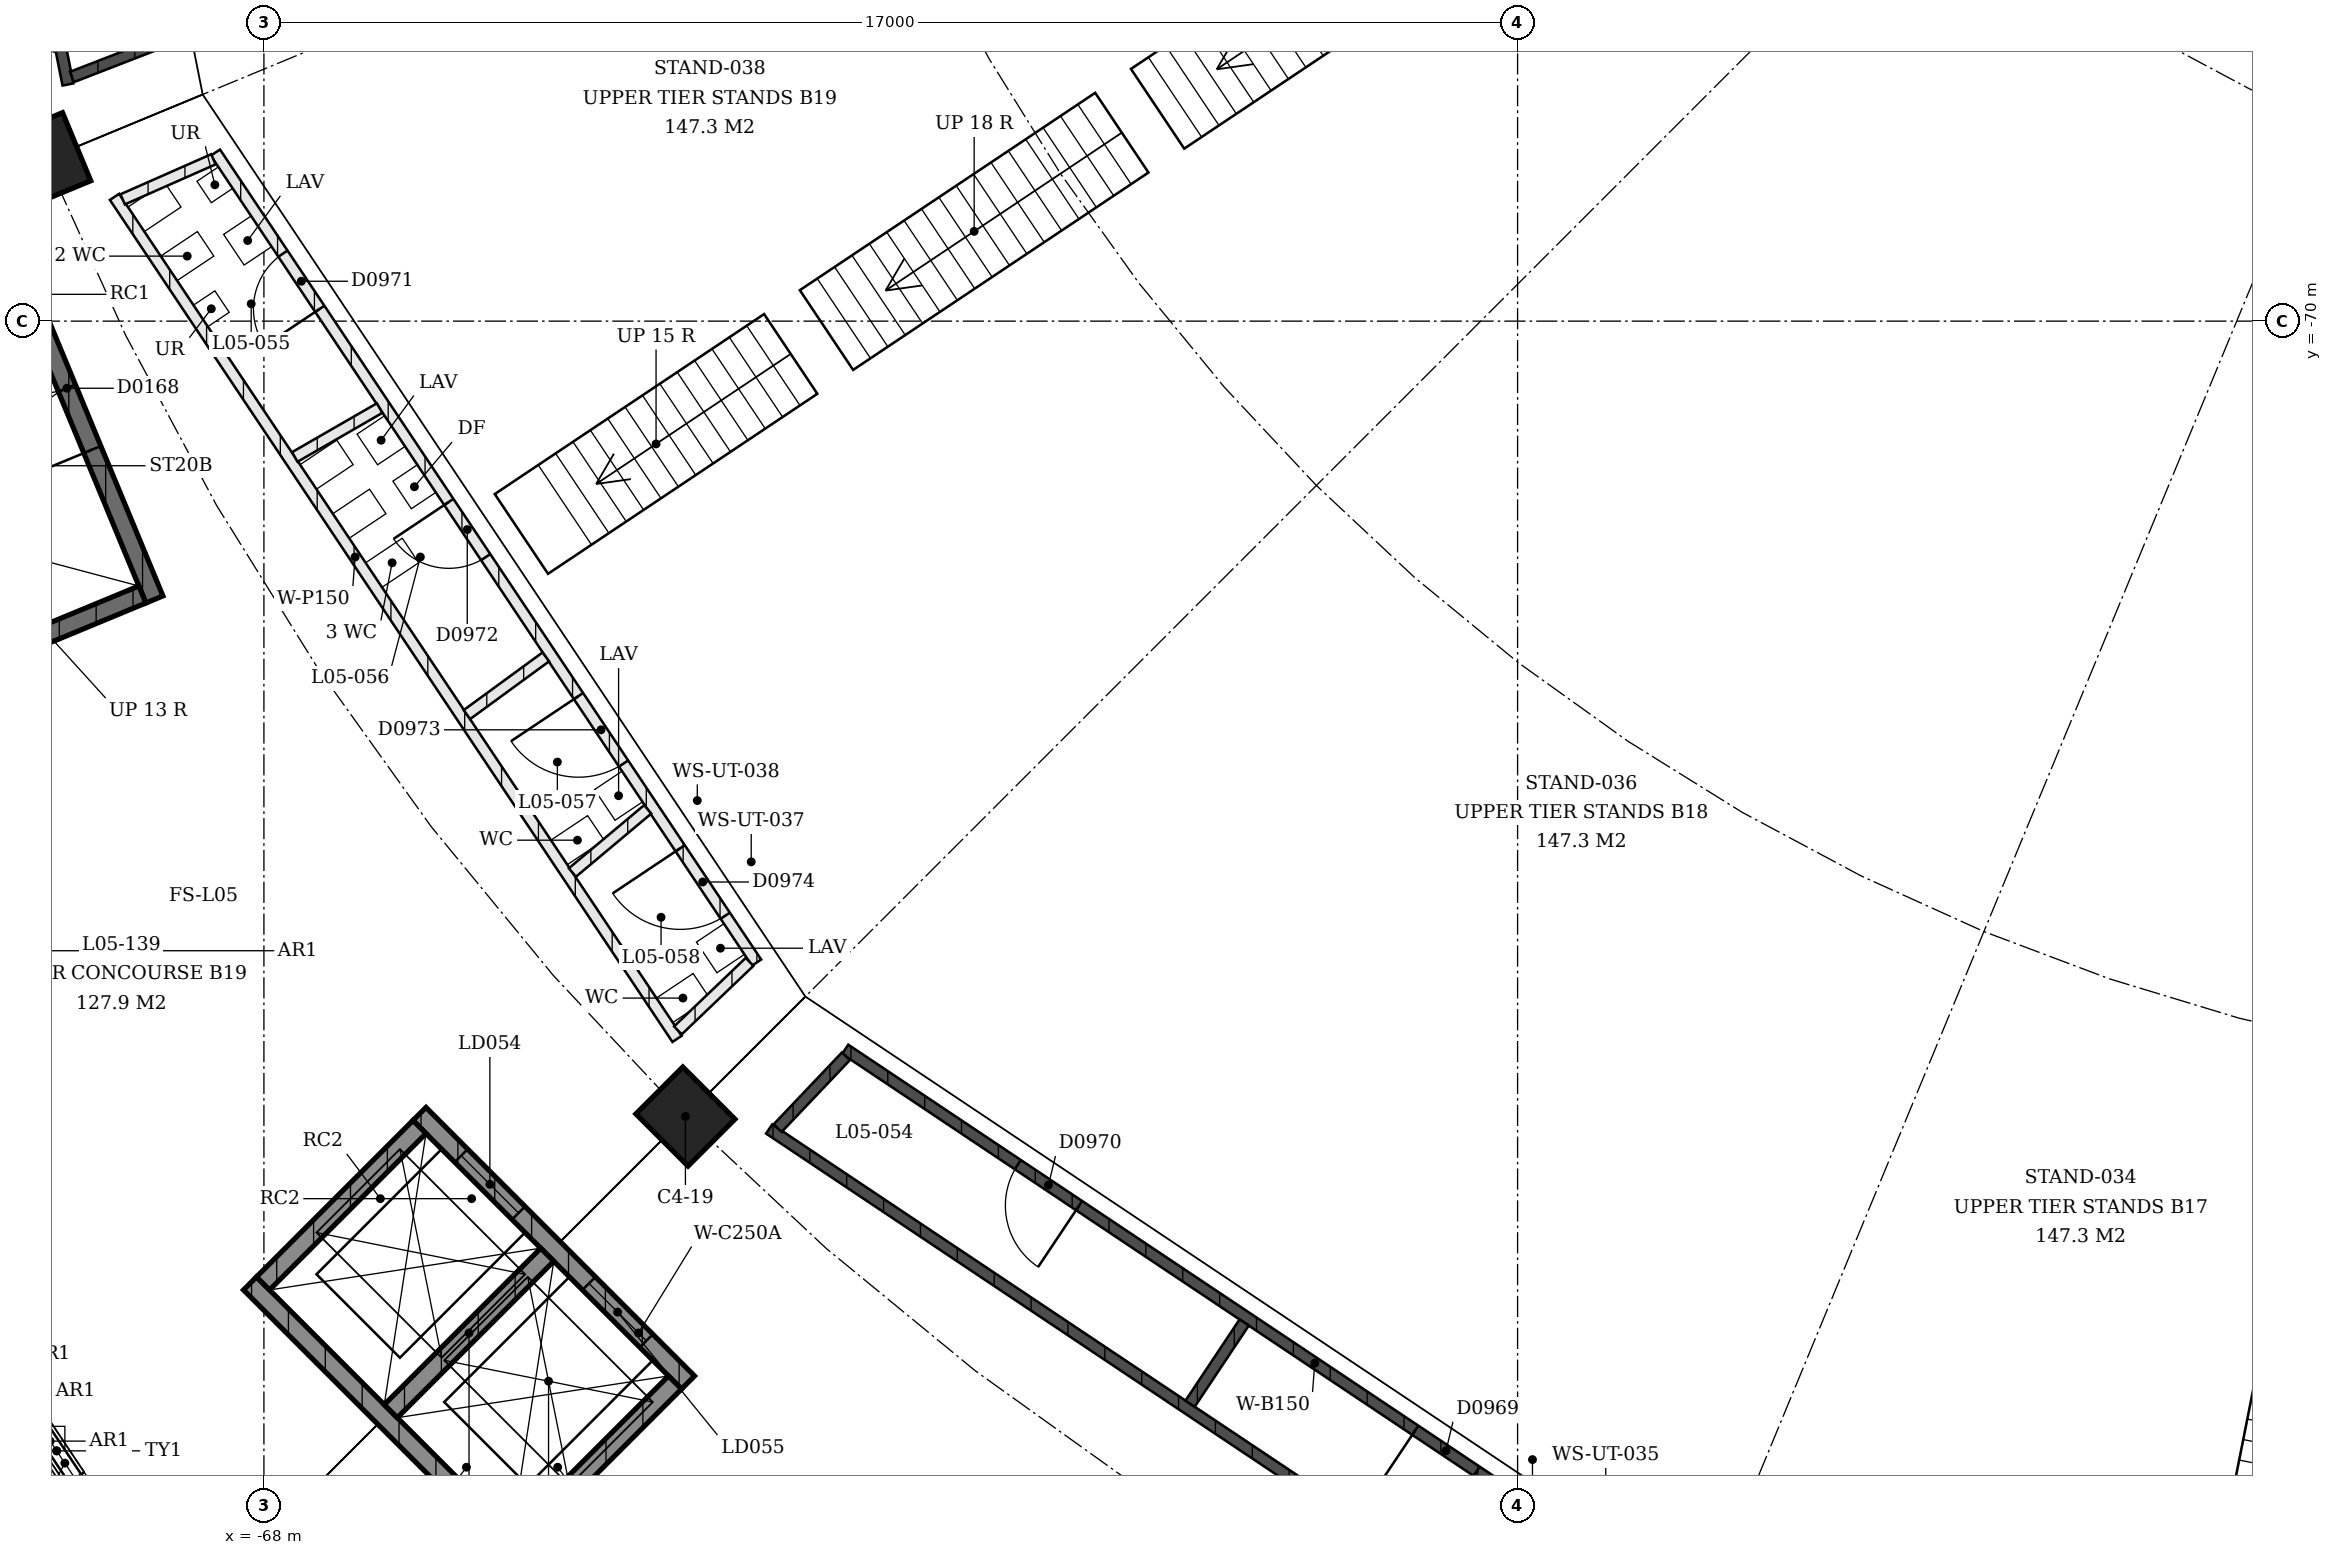
"""IFC4 building model, lengths in metres.
Left out: names, types, materials, properties, quantities, classifications, styles, units other than length and angle.
Written with IfcOpenShell. Run it as: python <this file> out.ifc"""

import sys

from ifc_helpers import new_model, si_unit, direction, frame, frame_2d, origin, origin_2d, place, context, subcontext, project, spatial, polyline, rectangle, outline, extrude, element, fill, save


model = new_model("IFC4")
c1 = context("Model", 3, precision=1e-05, world=origin(), true_north=direction((0.0, 1.0)))
c2 = subcontext(c1, "Body", "Model", "MODEL_VIEW")
j1 = project(units=[si_unit("LENGTHUNIT", "METRE"), si_unit("PLANEANGLEUNIT", "RADIAN")], contexts=[c1])
p1 = place(None, origin())
s1 = spatial("IfcSite", under=j1, at=p1, CompositionType="ELEMENT")
p2 = place(p1, origin())
s2 = spatial("IfcBuilding", under=s1, at=p2, CompositionType="ELEMENT")
p3 = place(p2, frame((0.0, 0.0, 22.5)))
s3 = spatial("IfcBuildingStorey", under=s2, at=p3, CompositionType="ELEMENT", Elevation=22.5)
for number, where, z_axis, x_axis in (
    (1, (-62.284, -80.784, 0.0), (0.0, 0.0, 1.0), (0.707, -0.707, 0.0)),
    (2, (-70.955, -67.807, 0.0), (0.0, 0.0, 1.0), (0.383, -0.924, 0.0)),
):
    element("IfcColumn", number, at=place(p3, frame(where, z_axis=z_axis, x_axis=x_axis)), inside=s3, PredefinedType="COLUMN", context=c2, shape_type="SweptSolid", body=[
        extrude(rectangle(XDim=1.0, YDim=0.9, at=origin_2d()), origin(), (0.0, 0.0, 1.0), 6.5),
    ])
p4 = place(p3, frame((-69.767, -86.879, 4.1), z_axis=(0.0, 0.0, 1.0), x_axis=(-0.555554703021, 0.831479988906, 0.0)))
e3 = element("IfcWall", 3, at=p4, inside=s3, PredefinedType="SOLIDWALL", context=c2, shape_type="SweptSolid", body=[
    extrude(outline(polyline([(0.0, 0.0), (3.757, 0.0), (3.757, 0.05), (3.635, 1.311), (3.271, 2.577), (2.678, 3.754), (1.879, 4.8), (1.079, 3.754), (0.486, 2.577), (0.123, 1.311), (0.0, 0.05), (0.0, 0.0)])), frame((0.0, 0.15, 0.0), z_axis=(0.0, -1.0, 0.0), x_axis=(1.0, 0.0, 0.0)), (0.0, 0.0, 1.0), 0.3),
])
p5 = place(p4, frame((1.428, 0.0, 0.4)))
e4 = element("IfcOpeningElement", 4, at=p5, cuts=e3, PredefinedType="OPENING", context=c2, shape_type="SweptSolid", body=[
    extrude(rectangle(XDim=0.9, YDim=3.6, at=frame_2d((0.45, 1.8))), frame((0.0, 0.16, 0.0), z_axis=(0.0, -1.0, 0.0), x_axis=(1.0, 0.0, 0.0)), (0.0, 0.0, 1.0), 0.32),
])
p6 = place(p3, frame((-74.135, -62.549, 0.0), z_axis=(0.0, 0.0, 1.0), x_axis=(0.382688386133, -0.923877480578, 0.0)))
e5 = element("IfcWall", 5, at=p6, inside=s3, PredefinedType="SHEAR", context=c2, shape_type="SweptSolid", body=[
    extrude(rectangle(XDim=12.15, YDim=0.25, at=frame_2d((6.075, 0.0))), origin(), (0.0, 0.0, 1.0), 2.1),
])
p7 = place(p6, frame((2.2, 0.0, 0.0)))
e6 = element("IfcOpeningElement", 6, at=p7, cuts=e5, PredefinedType="OPENING", context=c2, shape_type="SweptSolid", body=[
    extrude(rectangle(XDim=1.8, YDim=2.1, at=frame_2d((0.9, 1.05))), frame((0.0, 0.125, 0.0), z_axis=(0.0, -1.0, 0.0), x_axis=(1.0, 0.0, 0.0)), (0.0, 0.0, 1.0), 0.25),
])
p8 = place(p6, frame((8.15, 0.0, 0.0)))
e7 = element("IfcOpeningElement", 7, at=p8, cuts=e5, PredefinedType="OPENING", context=c2, shape_type="SweptSolid", body=[
    extrude(rectangle(XDim=1.8, YDim=2.1, at=frame_2d((0.9, 1.05))), frame((0.0, 0.125, 0.0), z_axis=(0.0, -1.0, 0.0), x_axis=(1.0, 0.0, 0.0)), (0.0, 0.0, 1.0), 0.25),
])
p9 = place(p3, frame((-69.648, -73.706, 0.0), z_axis=(0.0, 0.0, 1.0), x_axis=(-0.923887204407, -0.382664910245, 0.0)))
e8 = element("IfcWall", 8, at=p9, inside=s3, PredefinedType="SHEAR", context=c2, shape_type="SweptSolid", body=[
    extrude(rectangle(XDim=7.46, YDim=0.25, at=frame_2d((3.73, 0.0))), origin(), (0.0, 0.0, 1.0), 2.1),
])
p10 = place(p3, frame((-65.891, -80.749, 0.0), z_axis=(0.0, 0.0, 1.0), x_axis=(0.707106781187, -0.707106781187, 0.0)))
e9 = element("IfcWall", 9, at=p10, inside=s3, PredefinedType="SHEAR", context=c2, shape_type="SweptSolid", body=[
    extrude(rectangle(XDim=5.15, YDim=0.25, at=frame_2d((2.575, 0.0))), origin(), (0.0, 0.0, 1.0), 3.4),
])
p11 = place(p10, frame((0.8, 0.0, 0.0)))
e10 = element("IfcOpeningElement", 10, at=p11, cuts=e9, PredefinedType="OPENING", context=c2, shape_type="SweptSolid", body=[
    extrude(rectangle(XDim=1.1, YDim=2.1, at=frame_2d((0.55, 1.05))), frame((0.0, 0.125, 0.0), z_axis=(0.0, -1.0, 0.0), x_axis=(1.0, 0.0, 0.0)), (0.0, 0.0, 1.0), 0.25),
])
p12 = place(p10, frame((3.25, 0.0, 0.0)))
e11 = element("IfcOpeningElement", 11, at=p12, cuts=e9, PredefinedType="OPENING", context=c2, shape_type="SweptSolid", body=[
    extrude(rectangle(XDim=1.1, YDim=2.1, at=frame_2d((0.55, 1.05))), frame((0.0, 0.125, 0.0), z_axis=(0.0, -1.0, 0.0), x_axis=(1.0, 0.0, 0.0)), (0.0, 0.0, 1.0), 0.25),
])
p13 = place(p3, frame((-68.189, -83.047, 0.0), z_axis=(0.0, 0.0, 1.0), x_axis=(0.707106781187, -0.707106781187, 0.0)))
e12 = element("IfcWall", 12, at=p13, inside=s3, PredefinedType="SHEAR", context=c2, shape_type="SweptSolid", body=[
    extrude(rectangle(XDim=5.15, YDim=0.25, at=frame_2d((2.575, 0.0))), origin(), (0.0, 0.0, 1.0), 3.4),
])
for number, where, z_axis, x_axis in (
    (13, (-65.891, -80.926, 0.0), (0.0, 0.0, 1.0), (-0.707, -0.707, 0.0)),
    (14, (-62.426, -84.391, 0.0), (0.0, 0.0, 1.0), (-0.707, -0.707, 0.0)),
):
    element("IfcWall", number, at=place(p3, frame(where, z_axis=z_axis, x_axis=x_axis)), inside=s3, PredefinedType="SHEAR", context=c2, shape_type="SweptSolid", body=[
        extrude(rectangle(XDim=3.0, YDim=0.25, at=frame_2d((1.5, 0.0))), origin(), (0.0, 0.0, 1.0), 3.4),
    ])
p14 = place(p3, frame((-64.158, -82.658, 0.0), z_axis=(0.0, 0.0, 1.0), x_axis=(-0.707106781187, -0.707106781187, 0.0)))
e15 = element("IfcWall", 15, at=p14, inside=s3, PredefinedType="SHEAR", context=c2, shape_type="SweptSolid", body=[
    extrude(rectangle(XDim=3.0, YDim=0.25, at=frame_2d((1.5, 0.0))), origin(), (0.0, 0.0, 1.0), 3.4),
])
p15 = place(p3, frame((-49.215, -87.158, 0.0), z_axis=(0.0, 0.0, 1.0), x_axis=(-0.831468390799, 0.555572061125, 0.0)))
e16 = element("IfcWall", 16, at=p15, inside=s3, PredefinedType="SOLIDWALL", context=c2, shape_type="SweptSolid", body=[
    extrude(rectangle(XDim=13.113, YDim=0.15, at=frame_2d((6.557, 0.0))), origin(), (0.0, 0.0, 1.0), 3.0),
])
p16 = place(p15, frame((2.815, 0.0, 0.0)))
e17 = element("IfcOpeningElement", 17, at=p16, cuts=e16, PredefinedType="OPENING", context=c2, shape_type="SweptSolid", body=[
    extrude(rectangle(XDim=1.0, YDim=2.1, at=frame_2d((0.5, 1.05))), frame((0.0, 0.075, 0.0), z_axis=(0.0, -1.0, 0.0), x_axis=(1.0, 0.0, 0.0)), (0.0, 0.0, 1.0), 0.15),
])
p17 = place(p15, frame((9.298, 0.0, 0.0)))
e18 = element("IfcOpeningElement", 18, at=p17, cuts=e16, PredefinedType="OPENING", context=c2, shape_type="SweptSolid", body=[
    extrude(rectangle(XDim=1.0, YDim=2.1, at=frame_2d((0.5, 1.05))), frame((0.0, 0.075, 0.0), z_axis=(0.0, -1.0, 0.0), x_axis=(1.0, 0.0, 0.0)), (0.0, 0.0, 1.0), 0.15),
])
p18 = place(p3, frame((-49.815, -88.526, 0.0), z_axis=(0.0, 0.0, 1.0), x_axis=(-0.831462899962, 0.555580278616, 0.0)))
e19 = element("IfcWall", 19, at=p18, inside=s3, PredefinedType="SOLIDWALL", context=c2, shape_type="SweptSolid", body=[
    extrude(rectangle(XDim=13.631, YDim=0.15, at=frame_2d((6.815, 0.0))), origin(), (0.0, 0.0, 1.0), 3.0),
])
p19 = place(p3, frame((-54.707, -83.576, 0.0), z_axis=(0.0, 0.0, 1.0), x_axis=(-0.554402331293, -0.832248793966, 0.0)))
e20 = element("IfcWall", 20, at=p19, inside=s3, PredefinedType="SOLIDWALL", context=c2, shape_type="SweptSolid", body=[
    extrude(rectangle(XDim=1.324, YDim=0.15, at=frame_2d((0.662, 0.0))), origin(), (0.0, 0.0, 1.0), 3.0),
])
p20 = place(p3, frame((-60.108, -79.968, 0.0), z_axis=(0.0, 0.0, 1.0), x_axis=(-0.688797211472, -0.724954068523, 0.0)))
e21 = element("IfcWall", 21, at=p20, inside=s3, PredefinedType="SOLIDWALL", context=c2, shape_type="SweptSolid", body=[
    extrude(rectangle(XDim=1.344, YDim=0.15, at=frame_2d((0.672, 0.0))), origin(), (0.0, 0.0, 1.0), 3.0),
])
p21 = place(p3, frame((-68.658, -67.715, 0.0), z_axis=(0.0, 0.0, 1.0), x_axis=(0.555570028225, -0.831469749142, 0.0)))
e22 = element("IfcWall", 22, at=p21, inside=s3, PredefinedType="PARTITIONING", context=c2, shape_type="SweptSolid", body=[
    extrude(rectangle(XDim=13.209, YDim=0.15, at=frame_2d((6.604, 0.0))), origin(), (0.0, 0.0, 1.0), 3.0),
])
p22 = place(p21, frame((1.648, 0.0, 0.0)))
e23 = element("IfcOpeningElement", 23, at=p22, cuts=e22, PredefinedType="OPENING", context=c2, shape_type="SweptSolid", body=[
    extrude(rectangle(XDim=0.9, YDim=2.1, at=frame_2d((0.45, 1.05))), frame((0.0, 0.075, 0.0), z_axis=(0.0, -1.0, 0.0), x_axis=(1.0, 0.0, 0.0)), (0.0, 0.0, 1.0), 0.15),
])
p23 = place(p21, frame((5.697, 0.0, 0.0)))
e24 = element("IfcOpeningElement", 24, at=p23, cuts=e22, PredefinedType="OPENING", context=c2, shape_type="SweptSolid", body=[
    extrude(rectangle(XDim=0.9, YDim=2.1, at=frame_2d((0.45, 1.05))), frame((0.0, 0.075, 0.0), z_axis=(0.0, -1.0, 0.0), x_axis=(1.0, 0.0, 0.0)), (0.0, 0.0, 1.0), 0.15),
])
p24 = place(p21, frame((8.863, 0.0, 0.0)))
e25 = element("IfcOpeningElement", 25, at=p24, cuts=e22, PredefinedType="OPENING", context=c2, shape_type="SweptSolid", body=[
    extrude(rectangle(XDim=1.1, YDim=2.1, at=frame_2d((0.55, 1.05))), frame((0.0, 0.075, 0.0), z_axis=(0.0, -1.0, 0.0), x_axis=(1.0, 0.0, 0.0)), (0.0, 0.0, 1.0), 0.15),
])
p25 = place(p21, frame((11.344, 0.0, 0.0)))
e26 = element("IfcOpeningElement", 26, at=p25, cuts=e22, PredefinedType="OPENING", context=c2, shape_type="SweptSolid", body=[
    extrude(rectangle(XDim=1.1, YDim=2.1, at=frame_2d((0.55, 1.05))), frame((0.0, 0.075, 0.0), z_axis=(0.0, -1.0, 0.0), x_axis=(1.0, 0.0, 0.0)), (0.0, 0.0, 1.0), 0.15),
])
p26 = place(p3, frame((-70.026, -68.315, 0.0), z_axis=(0.0, 0.0, 1.0), x_axis=(0.555573905052, -0.831467158717, 0.0)))
e27 = element("IfcWall", 27, at=p26, inside=s3, PredefinedType="PARTITIONING", context=c2, shape_type="SweptSolid", body=[
    extrude(rectangle(XDim=13.73, YDim=0.15, at=frame_2d((6.865, 0.0))), origin(), (0.0, 0.0, 1.0), 3.0),
])
p27 = place(p3, frame((-68.685, -67.806, 0.0), z_axis=(0.0, 0.0, 1.0), x_axis=(-0.914894130368, -0.403693857048, 0.0)))
e28 = element("IfcWall", 28, at=p27, inside=s3, PredefinedType="PARTITIONING", context=c2, shape_type="SweptSolid", body=[
    extrude(rectangle(XDim=1.344, YDim=0.15, at=frame_2d((0.672, 0.0))), origin(), (0.0, 0.0, 1.0), 3.0),
])
p28 = place(p3, frame((-66.431, -71.179, 0.0), z_axis=(0.0, 0.0, 1.0), x_axis=(-0.866607990837, -0.498989569246, 0.0)))
e29 = element("IfcWall", 29, at=p28, inside=s3, PredefinedType="PARTITIONING", context=c2, shape_type="SweptSolid", body=[
    extrude(rectangle(XDim=1.327, YDim=0.15, at=frame_2d((0.664, 0.0))), origin(), (0.0, 0.0, 1.0), 3.0),
])
p29 = place(p3, frame((-64.177, -74.553, 0.0), z_axis=(0.0, 0.0, 1.0), x_axis=(-0.807323605105, -0.59010897014, 0.0)))
e30 = element("IfcWall", 30, at=p29, inside=s3, PredefinedType="PARTITIONING", context=c2, shape_type="SweptSolid", body=[
    extrude(rectangle(XDim=1.325, YDim=0.15, at=frame_2d((0.663, 0.0))), origin(), (0.0, 0.0, 1.0), 3.0),
])
p30 = place(p3, frame((-62.796, -76.62, 0.0), z_axis=(0.0, 0.0, 1.0), x_axis=(-0.766596080784, -0.642129620035, 0.0)))
e31 = element("IfcWall", 31, at=p30, inside=s3, PredefinedType="PARTITIONING", context=c2, shape_type="SweptSolid", body=[
    extrude(rectangle(XDim=1.332, YDim=0.15, at=frame_2d((0.666, 0.0))), origin(), (0.0, 0.0, 1.0), 3.0),
])
p31 = place(p3, frame((-61.414, -78.688, 0.0), z_axis=(0.0, 0.0, 1.0), x_axis=(-0.723174104738, -0.690665776072, 0.0)))
e32 = element("IfcWall", 32, at=p31, inside=s3, PredefinedType="PARTITIONING", context=c2, shape_type="SweptSolid", body=[
    extrude(rectangle(XDim=1.344, YDim=0.15, at=frame_2d((0.672, 0.0))), origin(), (0.0, 0.0, 1.0), 3.0),
])
p32 = place(p3, frame((-70.657, -66.791, 0.0), z_axis=(0.0, 0.0, 1.0), x_axis=(-0.195103376128, 0.980782683689, 0.0)))
e33 = element("IfcWall", 33, at=p32, inside=s3, PredefinedType="SOLIDWALL", context=c2, shape_type="SweptSolid", body=[
    extrude(rectangle(XDim=13.631, YDim=0.15, at=frame_2d((6.815, 0.0))), origin(), (0.0, 0.0, 1.0), 3.0),
])
p33 = place(p3, frame((-69.349, -66.203, 0.0), z_axis=(0.0, 0.0, 1.0), x_axis=(-0.932406277831, -0.36141186071, 0.0)))
e34 = element("IfcWall", 34, at=p33, inside=s3, PredefinedType="SOLIDWALL", context=c2, shape_type="SweptSolid", body=[
    extrude(rectangle(XDim=1.344, YDim=0.15, at=frame_2d((0.672, 0.0))), origin(), (0.0, 0.0, 1.0), 3.0),
])
p34 = place(p5, origin())
e35 = element("IfcWindow", 35, at=p34, inside=s3, PartitioningType="SINGLE_PANEL", PredefinedType="WINDOW", context=c2, shape_type="SweptSolid", body=[
    extrude(rectangle(XDim=0.9, YDim=3.6, at=frame_2d((0.45, 1.8))), frame((0.0, 0.03, 0.0), z_axis=(0.0, -1.0, 0.0), x_axis=(1.0, 0.0, 0.0)), (0.0, 0.0, 1.0), 0.06),
])
fill(e4, e35)
p35 = place(p8, origin())
e36 = element("IfcDoor", 36, at=p35, inside=s3, OperationType="DOUBLE_DOOR_SINGLE_SWING", PredefinedType="DOOR", context=c2, shape_type="SweptSolid", body=[
    extrude(rectangle(XDim=1.8, YDim=2.1, at=frame_2d((0.9, 1.05))), frame((0.0, 0.025, 0.0), z_axis=(0.0, -1.0, 0.0), x_axis=(1.0, 0.0, 0.0)), (0.0, 0.0, 1.0), 0.05),
])
fill(e7, e36)
p36 = place(p11, origin())
e37 = element("IfcDoor", 37, at=p36, inside=s3, OperationType="SLIDING_TO_LEFT", PredefinedType="DOOR", context=c2, shape_type="SweptSolid", body=[
    extrude(rectangle(XDim=1.1, YDim=2.1, at=frame_2d((0.55, 1.05))), frame((0.0, 0.025, 0.0), z_axis=(0.0, -1.0, 0.0), x_axis=(1.0, 0.0, 0.0)), (0.0, 0.0, 1.0), 0.05),
])
fill(e10, e37)
p37 = place(p12, origin())
e38 = element("IfcDoor", 38, at=p37, inside=s3, OperationType="SLIDING_TO_LEFT", PredefinedType="DOOR", context=c2, shape_type="SweptSolid", body=[
    extrude(rectangle(XDim=1.1, YDim=2.1, at=frame_2d((0.55, 1.05))), frame((0.0, 0.025, 0.0), z_axis=(0.0, -1.0, 0.0), x_axis=(1.0, 0.0, 0.0)), (0.0, 0.0, 1.0), 0.05),
])
fill(e11, e38)
p38 = place(p16, origin())
e39 = element("IfcDoor", 39, at=p38, inside=s3, OperationType="SINGLE_SWING_LEFT", PredefinedType="DOOR", context=c2, shape_type="SweptSolid", body=[
    extrude(rectangle(XDim=1.0, YDim=2.1, at=frame_2d((0.5, 1.05))), frame((0.0, 0.025, 0.0), z_axis=(0.0, -1.0, 0.0), x_axis=(1.0, 0.0, 0.0)), (0.0, 0.0, 1.0), 0.05),
])
fill(e17, e39)
p39 = place(p17, origin())
e40 = element("IfcDoor", 40, at=p39, inside=s3, OperationType="SINGLE_SWING_RIGHT", PredefinedType="DOOR", context=c2, shape_type="SweptSolid", body=[
    extrude(rectangle(XDim=1.0, YDim=2.1, at=frame_2d((0.5, 1.05))), frame((0.0, 0.025, 0.0), z_axis=(0.0, -1.0, 0.0), x_axis=(1.0, 0.0, 0.0)), (0.0, 0.0, 1.0), 0.05),
])
fill(e18, e40)
p40 = place(p22, origin())
e41 = element("IfcDoor", 41, at=p40, inside=s3, OperationType="SINGLE_SWING_RIGHT", PredefinedType="DOOR", context=c2, shape_type="SweptSolid", body=[
    extrude(rectangle(XDim=0.9, YDim=2.1, at=frame_2d((0.45, 1.05))), frame((0.0, 0.025, 0.0), z_axis=(0.0, -1.0, 0.0), x_axis=(1.0, 0.0, 0.0)), (0.0, 0.0, 1.0), 0.05),
])
fill(e23, e41)
p41 = place(p23, origin())
e42 = element("IfcDoor", 42, at=p41, inside=s3, OperationType="SINGLE_SWING_LEFT", PredefinedType="DOOR", context=c2, shape_type="SweptSolid", body=[
    extrude(rectangle(XDim=0.9, YDim=2.1, at=frame_2d((0.45, 1.05))), frame((0.0, 0.025, 0.0), z_axis=(0.0, -1.0, 0.0), x_axis=(1.0, 0.0, 0.0)), (0.0, 0.0, 1.0), 0.05),
])
fill(e24, e42)
p42 = place(p24, origin())
e43 = element("IfcDoor", 43, at=p42, inside=s3, OperationType="SINGLE_SWING_LEFT", PredefinedType="DOOR", context=c2, shape_type="SweptSolid", body=[
    extrude(rectangle(XDim=1.1, YDim=2.1, at=frame_2d((0.55, 1.05))), frame((0.0, 0.025, 0.0), z_axis=(0.0, -1.0, 0.0), x_axis=(1.0, 0.0, 0.0)), (0.0, 0.0, 1.0), 0.05),
])
fill(e25, e43)
p43 = place(p25, origin())
e44 = element("IfcDoor", 44, at=p43, inside=s3, OperationType="SINGLE_SWING_LEFT", PredefinedType="DOOR", context=c2, shape_type="SweptSolid", body=[
    extrude(rectangle(XDim=1.1, YDim=2.1, at=frame_2d((0.55, 1.05))), frame((0.0, 0.025, 0.0), z_axis=(0.0, -1.0, 0.0), x_axis=(1.0, 0.0, 0.0)), (0.0, 0.0, 1.0), 0.05),
])
fill(e26, e44)
save(model, sys.argv[1])
